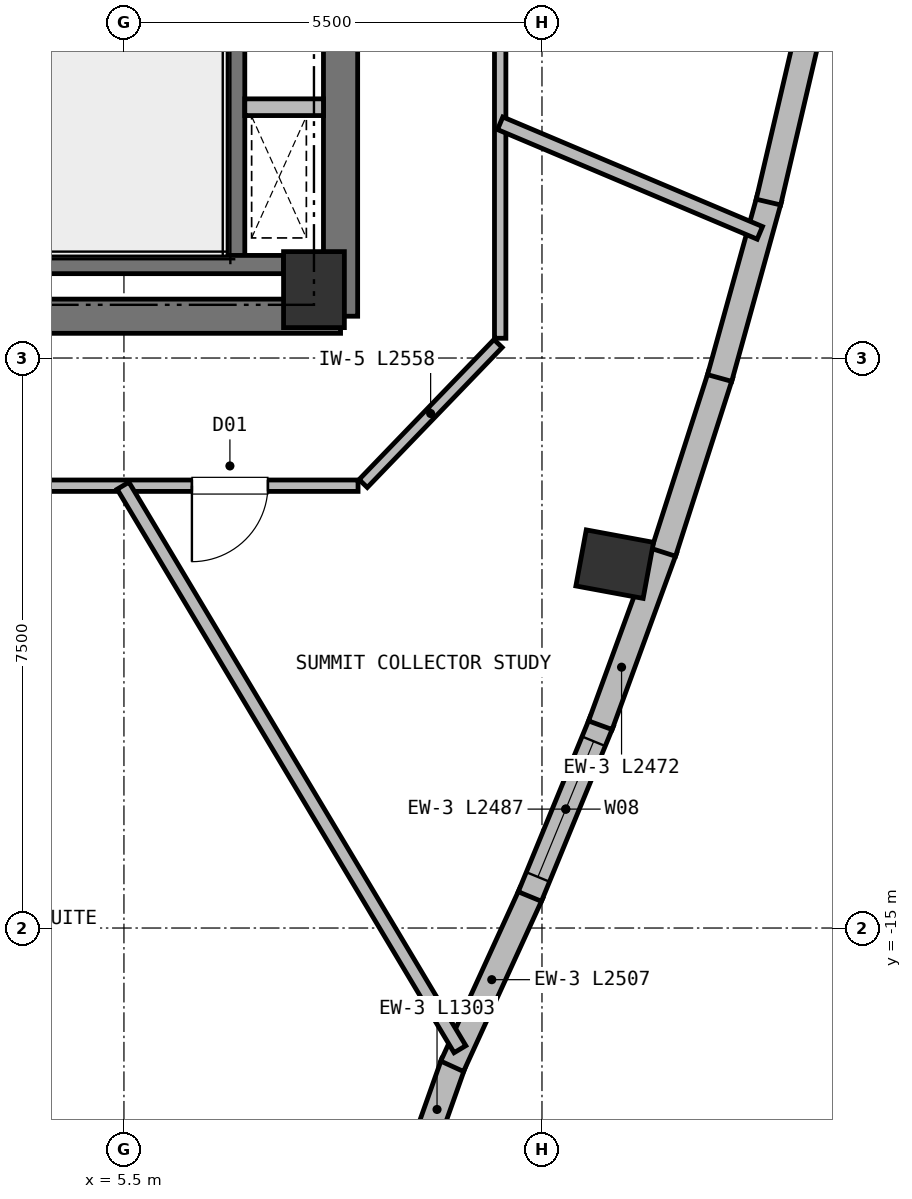
"""IFC4 building model, lengths in metres.
Left out: names, types, materials, properties, quantities, classifications, styles, units other than length and angle.
Written with IfcOpenShell. Run it as: python <this file> out.ifc"""

import sys

from ifc_helpers import new_model, si_unit, direction, frame, frame_2d, origin, origin_2d, place, context, subcontext, project, spatial, rectangle, extrude, element, fill, save


model = new_model("IFC4")
c1 = context("Model", 3, precision=1e-05, world=origin(), true_north=direction((0.0, 1.0)))
c2 = subcontext(c1, "Body", "Model", "MODEL_VIEW")
j1 = project(units=[si_unit("LENGTHUNIT", "METRE"), si_unit("PLANEANGLEUNIT", "RADIAN")], contexts=[c1])
p1 = place(None, origin())
s1 = spatial("IfcSite", under=j1, at=p1, CompositionType="ELEMENT")
p2 = place(p1, origin())
s2 = spatial("IfcBuilding", under=s1, at=p2, CompositionType="ELEMENT")
p3 = place(p2, frame((0.0, 0.0, 260.2)))
s3 = spatial("IfcBuildingStorey", under=s2, at=p3, CompositionType="ELEMENT", Elevation=260.2)
p4 = place(p3, frame((8.0, -6.6, 0.0), z_axis=(0.0, 0.0, 1.0), x_axis=(1.0, 0.0, 0.0)))
e1 = element("IfcColumn", 1, at=p4, inside=s3, PredefinedType="COLUMN", context=c2, shape_type="SweptSolid", body=[
    extrude(rectangle(XDim=0.8, YDim=1.0, at=origin_2d()), origin(), (0.0, 0.0, 1.0), 4.2),
])
p5 = place(p3, frame((4.4, -6.95, 0.0), z_axis=(0.0, 0.0, 1.0), x_axis=(1.0, 0.0, 0.0)))
e2 = element("IfcWall", 2, at=p5, inside=s3, PredefinedType="SHEAR", context=c2, shape_type="SweptSolid", body=[
    extrude(rectangle(XDim=3.95, YDim=0.45, at=frame_2d((1.975, 0.0))), origin(), (0.0, 0.0, 1.0), 3.95),
])
p6 = place(p3, frame((8.35, -6.95, 0.0), z_axis=(0.0, 0.0, 1.0), x_axis=(0.0, 1.0, 0.0)))
e3 = element("IfcWall", 3, at=p6, inside=s3, PredefinedType="SHEAR", context=c2, shape_type="SweptSolid", body=[
    extrude(rectangle(XDim=8.1, YDim=0.45, at=frame_2d((4.05, 0.0))), origin(), (0.0, 0.0, 1.0), 3.95),
])
p7 = place(p3, frame((11.957, -10.212, 0.0), z_axis=(0.0, 0.0, 1.0), x_axis=(0.182235525492, 0.983254907564, 0.0)))
e4 = element("IfcColumn", 4, at=p7, inside=s3, PredefinedType="COLUMN", context=c2, shape_type="SweptSolid", body=[
    extrude(rectangle(XDim=0.75, YDim=0.9, at=origin_2d()), origin(), (0.0, 0.0, 1.0), 4.2),
])
p8 = place(p3, frame((9.837, -16.773, 0.0), z_axis=(0.0, 0.0, 1.0), x_axis=(-0.333652931337, -0.942695985676, 0.0)))
e5 = element("IfcWall", 5, at=p8, inside=s3, PredefinedType="SOLIDWALL", context=c2, shape_type="SweptSolid", body=[
    extrude(rectangle(XDim=1.303, YDim=0.33, at=frame_2d((0.652, 0.0))), origin(), (0.0, 0.0, 1.0), 3.95),
])
p9 = place(p3, frame((10.86, -14.54, 0.0), z_axis=(0.0, 0.0, 1.0), x_axis=(-0.415812703035, -0.909450271315, 0.0)))
e6 = element("IfcWall", 6, at=p9, inside=s3, PredefinedType="SOLIDWALL", context=c2, shape_type="SweptSolid", body=[
    extrude(rectangle(XDim=2.507, YDim=0.33, at=frame_2d((1.253, 0.0))), origin(), (0.0, 0.0, 1.0), 3.95),
])
p10 = place(p3, frame((11.786, -12.285, 0.0), z_axis=(0.0, 0.0, 1.0), x_axis=(-0.380073332614, -0.92495635672, 0.0)))
e7 = element("IfcWall", 7, at=p10, inside=s3, PredefinedType="SOLIDWALL", context=c2, shape_type="SweptSolid", body=[
    extrude(rectangle(XDim=2.487, YDim=0.33, at=frame_2d((1.244, 0.0))), origin(), (0.0, 0.0, 1.0), 3.95),
])
p11 = place(p10, frame((0.279, 0.0, 0.72)))
e8 = element("IfcOpeningElement", 8, at=p11, cuts=e7, PredefinedType="OPENING", context=c2, shape_type="SweptSolid", body=[
    extrude(rectangle(XDim=1.93, YDim=2.1, at=frame_2d((0.965, 1.05))), frame((0.0, 0.175, 0.0), z_axis=(0.0, -1.0, 0.0), x_axis=(1.0, 0.0, 0.0)), (0.0, 0.0, 1.0), 0.35),
])
p12 = place(p3, frame((12.616, -10.01, 0.0), z_axis=(0.0, 0.0, 1.0), x_axis=(-0.343296836241, -0.939226959913, 0.0)))
e9 = element("IfcWall", 9, at=p12, inside=s3, PredefinedType="SOLIDWALL", context=c2, shape_type="SweptSolid", body=[
    extrude(rectangle(XDim=2.472, YDim=0.33, at=frame_2d((1.236, 0.0))), origin(), (0.0, 0.0, 1.0), 3.95),
])
p13 = place(p3, frame((13.352, -7.715, 0.0), z_axis=(0.0, 0.0, 1.0), x_axis=(-0.305488679376, -0.952195708231, 0.0)))
e10 = element("IfcWall", 10, at=p13, inside=s3, PredefinedType="SOLIDWALL", context=c2, shape_type="SweptSolid", body=[
    extrude(rectangle(XDim=2.46, YDim=0.33, at=frame_2d((1.23, 0.0))), origin(), (0.0, 0.0, 1.0), 3.95),
])
p14 = place(p3, frame((13.992, -5.4, 0.0), z_axis=(0.0, 0.0, 1.0), x_axis=(-0.266940258734, -0.963713078809, 0.0)))
e11 = element("IfcWall", 11, at=p14, inside=s3, PredefinedType="SOLIDWALL", context=c2, shape_type="SweptSolid", body=[
    extrude(rectangle(XDim=2.452, YDim=0.33, at=frame_2d((1.226, 0.0))), origin(), (0.0, 0.0, 1.0), 3.95),
])
p15 = place(p3, frame((14.537, -3.064, 0.0), z_axis=(0.0, 0.0, 1.0), x_axis=(-0.227677260712, -0.97373665072, 0.0)))
e12 = element("IfcWall", 12, at=p15, inside=s3, PredefinedType="SOLIDWALL", context=c2, shape_type="SweptSolid", body=[
    extrude(rectangle(XDim=2.448, YDim=0.33, at=frame_2d((1.224, 0.0))), origin(), (0.0, 0.0, 1.0), 3.95),
])
p16 = place(p3, frame((6.97, -6.16, 0.0), z_axis=(0.0, 0.0, 1.0), x_axis=(0.0, 1.0, 0.0)))
e13 = element("IfcWall", 13, at=p16, inside=s3, PredefinedType="SHEAR", context=c2, shape_type="SweptSolid", body=[
    extrude(rectangle(XDim=7.22, YDim=0.24, at=frame_2d((3.61, 0.0))), origin(), (0.0, 0.0, 1.0), 3.95),
])
p17 = place(p3, frame((4.01, -6.27, 0.0), z_axis=(0.0, 0.0, 1.0), x_axis=(1.0, 0.0, 0.0)))
e14 = element("IfcWall", 14, at=p17, inside=s3, PredefinedType="SHEAR", context=c2, shape_type="SweptSolid", body=[
    extrude(rectangle(XDim=3.59, YDim=0.24, at=frame_2d((1.795, 0.0))), origin(), (0.0, 0.0, 1.0), 3.95),
])
p18 = place(p3, frame((7.09, -4.2, 0.0), z_axis=(0.0, 0.0, 1.0), x_axis=(1.0, 0.0, 0.0)))
e15 = element("IfcWall", 15, at=p18, inside=s3, PredefinedType="PARTITIONING", context=c2, shape_type="SweptSolid", body=[
    extrude(rectangle(XDim=1.035, YDim=0.22, at=frame_2d((0.518, 0.0))), origin(), (0.0, 0.0, 1.0), 3.95),
])
p19 = place(p3, frame((8.58, -9.18, 0.0), z_axis=(0.0, 0.0, 1.0), x_axis=(-1.0, 0.0, 0.0)))
e16 = element("IfcWall", 16, at=p19, inside=s3, PredefinedType="PARTITIONING", context=c2, shape_type="SweptSolid", body=[
    extrude(rectangle(XDim=17.16, YDim=0.15, at=frame_2d((8.58, 0.0))), origin(), (0.0, 0.0, 1.0), 3.66),
])
p20 = place(p19, frame((12.871, 0.0, 0.0)))
e17 = element("IfcOpeningElement", 17, at=p20, cuts=e16, PredefinedType="OPENING", context=c2, shape_type="SweptSolid", body=[
    extrude(rectangle(XDim=1.06, YDim=2.15, at=frame_2d((0.53, 1.075))), frame((0.0, 0.085, 0.0), z_axis=(0.0, -1.0, 0.0), x_axis=(1.0, 0.0, 0.0)), (0.0, 0.0, 1.0), 0.17),
])
p21 = place(p19, frame((1.186, 0.0, 0.0)))
e18 = element("IfcOpeningElement", 18, at=p21, cuts=e16, PredefinedType="OPENING", context=c2, shape_type="SweptSolid", body=[
    extrude(rectangle(XDim=1.0, YDim=2.15, at=frame_2d((0.5, 1.075))), frame((0.0, 0.085, 0.0), z_axis=(0.0, -1.0, 0.0), x_axis=(1.0, 0.0, 0.0)), (0.0, 0.0, 1.0), 0.17),
])
p22 = place(p19, frame((4.747, 0.0, 0.0)))
e19 = element("IfcOpeningElement", 19, at=p22, cuts=e16, PredefinedType="OPENING", context=c2, shape_type="SweptSolid", body=[
    extrude(rectangle(XDim=1.06, YDim=2.15, at=frame_2d((0.53, 1.075))), frame((0.0, 0.085, 0.0), z_axis=(0.0, -1.0, 0.0), x_axis=(1.0, 0.0, 0.0)), (0.0, 0.0, 1.0), 0.17),
])
p23 = place(p3, frame((10.422, -7.309, 0.0), z_axis=(0.0, 0.0, 1.0), x_axis=(-0.693764562202, -0.720201869085, 0.0)))
e20 = element("IfcWall", 20, at=p23, inside=s3, PredefinedType="PARTITIONING", context=c2, shape_type="SweptSolid", body=[
    extrude(rectangle(XDim=2.558, YDim=0.15, at=frame_2d((1.279, 0.0))), origin(), (0.0, 0.0, 1.0), 3.95),
])
p24 = place(p3, frame((10.45, 8.65, 0.0), z_axis=(0.0, 0.0, 1.0), x_axis=(0.0, -1.0, 0.0)))
e21 = element("IfcWall", 21, at=p24, inside=s3, PredefinedType="PARTITIONING", context=c2, shape_type="SweptSolid", body=[
    extrude(rectangle(XDim=15.89, YDim=0.15, at=frame_2d((7.945, 0.0))), origin(), (0.0, 0.0, 1.0), 3.66),
])
p25 = place(p24, frame((7.641, 0.0, 0.0)))
e22 = element("IfcOpeningElement", 22, at=p25, cuts=e21, PredefinedType="OPENING", context=c2, shape_type="SweptSolid", body=[
    extrude(rectangle(XDim=1.0, YDim=2.15, at=frame_2d((0.5, 1.075))), frame((0.0, 0.085, 0.0), z_axis=(0.0, -1.0, 0.0), x_axis=(1.0, 0.0, 0.0)), (0.0, 0.0, 1.0), 0.17),
])
p26 = place(p3, frame((5.488, -9.18, 0.0), z_axis=(0.0, 0.0, 1.0), x_axis=(0.513144382801, -0.858302302455, 0.0)))
e23 = element("IfcWall", 23, at=p26, inside=s3, PredefinedType="PARTITIONING", context=c2, shape_type="SweptSolid", body=[
    extrude(rectangle(XDim=8.639, YDim=0.18, at=frame_2d((4.319, 0.0))), origin(), (0.0, 0.0, 1.0), 3.95),
])
p27 = place(p3, frame((10.45, -4.411, 0.0), z_axis=(0.0, 0.0, 1.0), x_axis=(0.921276821657, -0.388907466986, 0.0)))
e24 = element("IfcWall", 24, at=p27, inside=s3, PredefinedType="PARTITIONING", context=c2, shape_type="SweptSolid", body=[
    extrude(rectangle(XDim=3.708, YDim=0.18, at=frame_2d((1.854, 0.0))), origin(), (0.0, 0.0, 1.0), 3.95),
])
p28 = place(p11, origin())
e25 = element("IfcWindow", 25, at=p28, inside=s3, PartitioningType="SINGLE_PANEL", PredefinedType="WINDOW", context=c2, shape_type="SweptSolid", body=[
    extrude(rectangle(XDim=1.93, YDim=2.1, at=frame_2d((0.965, 1.05))), frame((0.0, 0.03, 0.0), z_axis=(0.0, -1.0, 0.0), x_axis=(1.0, 0.0, 0.0)), (0.0, 0.0, 1.0), 0.06),
])
fill(e8, e25)
p29 = place(p21, origin())
e26 = element("IfcDoor", 26, at=p29, inside=s3, OperationType="SINGLE_SWING_RIGHT", PredefinedType="DOOR", context=c2, shape_type="SweptSolid", body=[
    extrude(rectangle(XDim=1.0, YDim=2.15, at=frame_2d((0.5, 1.075))), frame((0.0, 0.025, 0.0), z_axis=(0.0, -1.0, 0.0), x_axis=(1.0, 0.0, 0.0)), (0.0, 0.0, 1.0), 0.05),
])
fill(e18, e26)
save(model, sys.argv[1])
